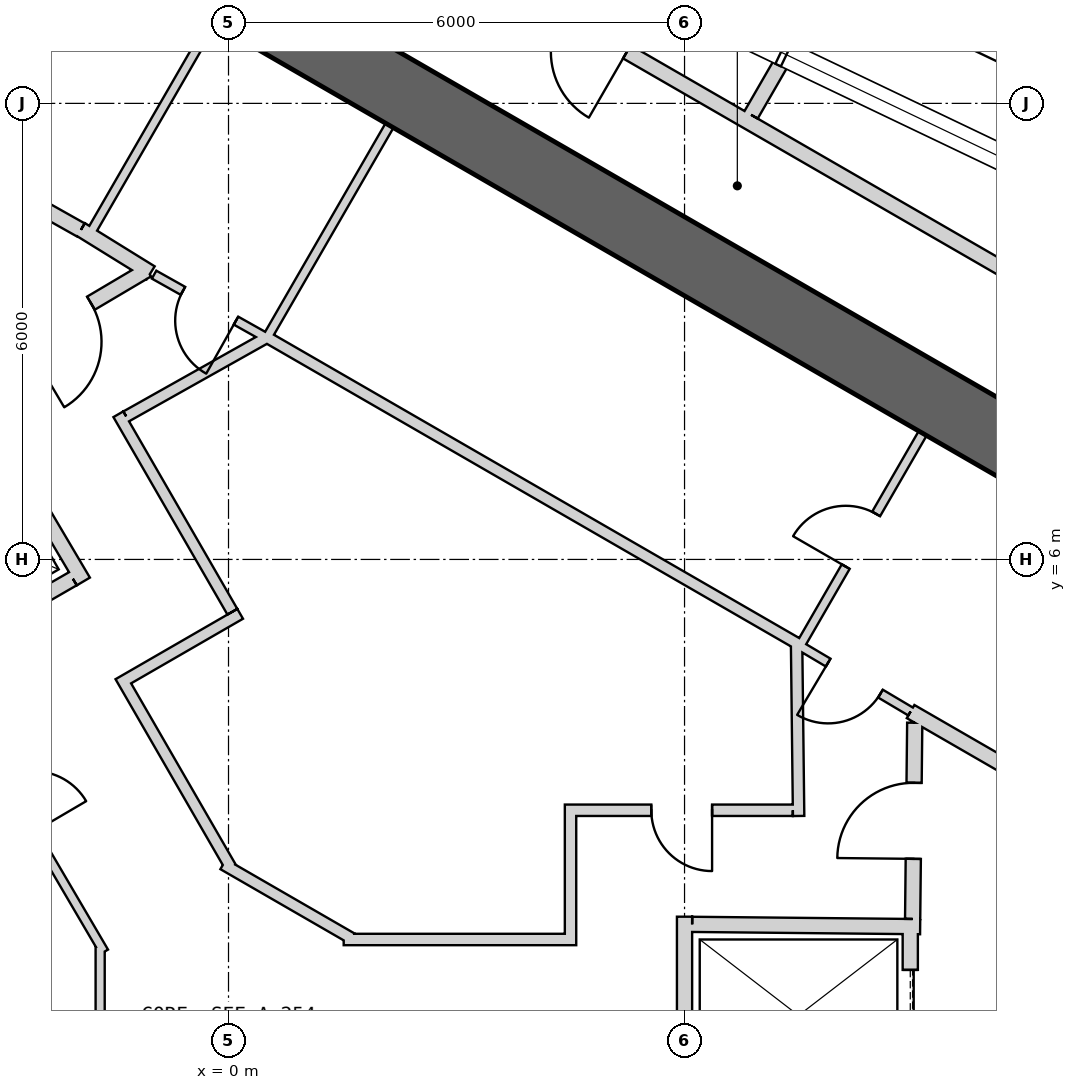
"""IFC4 building model, lengths in metres.
Left out: names, types, materials, properties, quantities, classifications, styles, units other than length and angle.
Written with IfcOpenShell. Run it as: python <this file> out.ifc"""

import sys

from ifc_helpers import new_model, si_unit, direction, frame, frame_2d, origin, place, context, subcontext, project, spatial, rectangle, extrude, element, fill, save


model = new_model("IFC4")
c1 = context("Model", 3, precision=1e-05, world=origin(), true_north=direction((0.0, 1.0)))
c2 = subcontext(c1, "Body", "Model", "MODEL_VIEW")
j1 = project(units=[si_unit("LENGTHUNIT", "METRE"), si_unit("PLANEANGLEUNIT", "RADIAN")], contexts=[c1])
p1 = place(None, origin())
s1 = spatial("IfcSite", under=j1, at=p1, CompositionType="ELEMENT")
p2 = place(p1, origin())
s2 = spatial("IfcBuilding", under=s1, at=p2, CompositionType="ELEMENT")
p3 = place(p2, frame((0.0, 0.0, 430.3)))
s3 = spatial("IfcBuildingStorey", under=s2, at=p3, CompositionType="ELEMENT", Elevation=430.3)
p4 = place(p3, frame((19.475, 2.208, 0.0), z_axis=(0.0, 0.0, 1.0), x_axis=(-0.866028369851, 0.499994862586, 0.0)))
e1 = element("IfcWall", 1, at=p4, inside=s3, PredefinedType="SHEAR", context=c2, shape_type="SweptSolid", body=[
    extrude(rectangle(XDim=31.523, YDim=0.9, at=frame_2d((15.762, 0.0))), origin(), (0.0, 0.0, 1.0), 5.0),
])
p5 = place(p4, frame((3.612, 0.0, 0.0)))
e2 = element("IfcOpeningElement", 2, at=p5, cuts=e1, PredefinedType="OPENING", context=c2, shape_type="SweptSolid", body=[
    extrude(rectangle(XDim=1.2, YDim=2.4, at=frame_2d((0.6, 1.2))), frame((0.0, 0.46, 0.0), z_axis=(0.0, -1.0, 0.0), x_axis=(1.0, 0.0, 0.0)), (0.0, 0.0, 1.0), 0.92),
])
p6 = place(p4, frame((26.712, 0.0, 0.0)))
e3 = element("IfcOpeningElement", 3, at=p6, cuts=e1, PredefinedType="OPENING", context=c2, shape_type="SweptSolid", body=[
    extrude(rectangle(XDim=1.2, YDim=2.4, at=frame_2d((0.6, 1.2))), frame((0.0, 0.46, 0.0), z_axis=(0.0, -1.0, 0.0), x_axis=(1.0, 0.0, 0.0)), (0.0, 0.0, 1.0), 0.92),
])
p7 = place(p3, frame((8.97, 1.2, 0.0), z_axis=(0.0, 0.0, 1.0), x_axis=(0.0, -1.0, 0.0)))
e4 = element("IfcWall", 4, at=p7, inside=s3, PredefinedType="PLUMBINGWALL", context=c2, shape_type="SweptSolid", body=[
    extrude(rectangle(XDim=2.4, YDim=0.2, at=frame_2d((1.2, 0.0))), origin(), (0.0, 0.0, 1.0), 4.75),
])
p8 = place(p7, frame((0.6, 0.0, 0.0)))
e5 = element("IfcOpeningElement", 5, at=p8, cuts=e4, PredefinedType="OPENING", context=c2, shape_type="SweptSolid", body=[
    extrude(rectangle(XDim=1.2, YDim=2.4, at=frame_2d((0.6, 1.2))), frame((0.0, 0.11, 0.0), z_axis=(0.0, -1.0, 0.0), x_axis=(1.0, 0.0, 0.0)), (0.0, 0.0, 1.0), 0.22),
])
p9 = place(p3, frame((6.0, -1.1, 0.0), z_axis=(0.0, 0.0, 1.0), x_axis=(0.0, 1.0, 0.0)))
e6 = element("IfcWall", 6, at=p9, inside=s3, PredefinedType="PLUMBINGWALL", context=c2, shape_type="SweptSolid", body=[
    extrude(rectangle(XDim=2.4, YDim=0.2, at=frame_2d((1.2, 0.0))), origin(), (0.0, 0.0, 1.0), 4.75),
])
p10 = place(p3, frame((9.1, 1.169, 0.0), z_axis=(0.0, 0.0, 1.0), x_axis=(-0.99994990606, 0.010009264196, 0.0)))
e7 = element("IfcWall", 7, at=p10, inside=s3, PredefinedType="PLUMBINGWALL", context=c2, shape_type="SweptSolid", body=[
    extrude(rectangle(XDim=3.0, YDim=0.2, at=frame_2d((1.5, 0.0))), origin(), (0.0, 0.0, 1.0), 4.75),
])
p11 = place(p3, frame((-2.047, 5.746, 0.0), z_axis=(0.0, 0.0, 1.0), x_axis=(-0.86605622881, -0.499946605688, 0.0)))
e8 = element("IfcWall", 8, at=p11, inside=s3, PredefinedType="PLUMBINGWALL", context=c2, shape_type="SweptSolid", body=[
    extrude(rectangle(XDim=2.2, YDim=0.2, at=frame_2d((1.1, 0.0))), origin(), (0.0, 0.0, 1.0), 4.75),
])
p12 = place(p3, frame((-3.538, 8.465, 0.0), z_axis=(0.0, 0.0, 1.0), x_axis=(0.508616218331, -0.860993346345, 0.0)))
e9 = element("IfcWall", 9, at=p12, inside=s3, PredefinedType="PLUMBINGWALL", context=c2, shape_type="SweptSolid", body=[
    extrude(rectangle(XDim=3.2, YDim=0.2, at=frame_2d((1.6, 0.0))), origin(), (0.0, 0.0, 1.0), 4.75),
])
p13 = place(p3, frame((7.508, 4.845, 0.0), z_axis=(0.0, 0.0, 1.0), x_axis=(0.500017246033, 0.866015446554, 0.0)))
e10 = element("IfcWall", 10, at=p13, inside=s3, PredefinedType="PARTITIONING", context=c2, shape_type="SweptSolid", body=[
    extrude(rectangle(XDim=3.25, YDim=0.12, at=frame_2d((1.625, 0.0))), origin(), (0.0, 0.0, 1.0), 4.75),
])
p14 = place(p13, frame((1.225, 0.0, 0.0)))
e11 = element("IfcOpeningElement", 11, at=p14, cuts=e10, PredefinedType="OPENING", context=c2, shape_type="SweptSolid", body=[
    extrude(rectangle(XDim=0.8, YDim=2.1, at=frame_2d((0.4, 1.05))), frame((0.0, 0.07, 0.0), z_axis=(0.0, -1.0, 0.0), x_axis=(1.0, 0.0, 0.0)), (0.0, 0.0, 1.0), 0.14),
])
p15 = place(p3, frame((8.974, 3.999, 0.0), z_axis=(0.0, 0.0, 1.0), x_axis=(0.86601284211, -0.500021756827, 0.0)))
e12 = element("IfcWall", 12, at=p15, inside=s3, PredefinedType="PARTITIONING", context=c2, shape_type="SweptSolid", body=[
    extrude(rectangle(XDim=3.577, YDim=0.2, at=frame_2d((1.789, 0.0))), origin(), (0.0, 0.0, 1.0), 4.75),
])
p16 = place(p3, frame((7.493, 4.878, 0.0), z_axis=(0.0, 0.0, 1.0), x_axis=(0.859934455514, -0.510404479035, 0.0)))
e13 = element("IfcWall", 13, at=p16, inside=s3, PredefinedType="PARTITIONING", context=c2, shape_type="SweptSolid", body=[
    extrude(rectangle(XDim=1.722, YDim=0.12, at=frame_2d((0.861, 0.0))), origin(), (0.0, 0.0, 1.0), 4.75),
])
p17 = place(p16, frame((0.461, 0.0, 0.0)))
e14 = element("IfcOpeningElement", 14, at=p17, cuts=e13, PredefinedType="OPENING", context=c2, shape_type="SweptSolid", body=[
    extrude(rectangle(XDim=0.8, YDim=2.1, at=frame_2d((0.4, 1.05))), frame((0.0, 0.07, 0.0), z_axis=(0.0, -1.0, 0.0), x_axis=(1.0, 0.0, 0.0)), (0.0, 0.0, 1.0), 0.14),
])
p18 = place(p3, frame((2.119, 11.709, 0.0), z_axis=(0.0, 0.0, 1.0), x_axis=(-0.500017246033, -0.866015446554, 0.0)))
e15 = element("IfcWall", 15, at=p18, inside=s3, PredefinedType="PARTITIONING", context=c2, shape_type="SweptSolid", body=[
    extrude(rectangle(XDim=3.25, YDim=0.12, at=frame_2d((1.625, 0.0))), origin(), (0.0, 0.0, 1.0), 4.75),
])
p19 = place(p3, frame((7.497, 4.886, 0.0), z_axis=(0.0, 0.0, 1.0), x_axis=(-0.866030989016, 0.499990325971, 0.0)))
e16 = element("IfcWall", 16, at=p19, inside=s3, PredefinedType="PLUMBINGWALL", context=c2, shape_type="SweptSolid", body=[
    extrude(rectangle(XDim=8.1, YDim=0.15, at=frame_2d((4.05, 0.0))), origin(), (0.0, 0.0, 1.0), 4.75),
])
p20 = place(p3, frame((-0.22, 13.06, 0.0), z_axis=(0.0, 0.0, 1.0), x_axis=(-0.499984717929, -0.866034226713, 0.0)))
e17 = element("IfcWall", 17, at=p20, inside=s3, PredefinedType="PARTITIONING", context=c2, shape_type="SweptSolid", body=[
    extrude(rectangle(XDim=3.25, YDim=0.12, at=frame_2d((1.625, 0.0))), origin(), (0.0, 0.0, 1.0), 4.75),
])
p21 = place(p3, frame((-1.941, 10.339, 0.0), z_axis=(0.0, 0.0, 1.0), x_axis=(0.850216889117, -0.526432561171, 0.0)))
e18 = element("IfcWall", 18, at=p21, inside=s3, PredefinedType="PARTITIONING", context=c2, shape_type="SweptSolid", body=[
    extrude(rectangle(XDim=1.078, YDim=0.2, at=frame_2d((0.539, 0.0))), origin(), (0.0, 0.0, 1.0), 4.75),
])
p22 = place(p3, frame((-0.979, 9.747, 0.0), z_axis=(0.0, 0.0, 1.0), x_axis=(0.871957532922, -0.489581515972, 0.0)))
e19 = element("IfcWall", 19, at=p22, inside=s3, PredefinedType="PARTITIONING", context=c2, shape_type="SweptSolid", body=[
    extrude(rectangle(XDim=1.672, YDim=0.12, at=frame_2d((0.836, 0.0))), origin(), (0.0, 0.0, 1.0), 4.75),
])
p23 = place(p22, frame((0.436, 0.0, 0.0)))
e20 = element("IfcOpeningElement", 20, at=p23, cuts=e19, PredefinedType="OPENING", context=c2, shape_type="SweptSolid", body=[
    extrude(rectangle(XDim=0.8, YDim=2.1, at=frame_2d((0.4, 1.05))), frame((0.0, 0.07, 0.0), z_axis=(0.0, -1.0, 0.0), x_axis=(1.0, 0.0, 0.0)), (0.0, 0.0, 1.0), 0.14),
])
p24 = place(p3, frame((-4.296, 11.659, 0.0), z_axis=(0.0, 0.0, 1.0), x_axis=(0.871534483978, -0.490334215854, 0.0)))
e21 = element("IfcWall", 21, at=p24, inside=s3, PredefinedType="PARTITIONING", context=c2, shape_type="SweptSolid", body=[
    extrude(rectangle(XDim=2.7, YDim=0.2, at=frame_2d((1.35, 0.0))), origin(), (0.0, 0.0, 1.0), 4.75),
])
p25 = place(p3, frame((9.001, 1.27, 0.0), z_axis=(0.0, 0.0, 1.0), x_axis=(0.010780534828, 0.999941888346, 0.0)))
e22 = element("IfcWall", 22, at=p25, inside=s3, PredefinedType="PARTITIONING", context=c2, shape_type="SweptSolid", body=[
    extrude(rectangle(XDim=2.582, YDim=0.2, at=frame_2d((1.291, 0.0))), origin(), (0.0, 0.0, 1.0), 4.75),
])
p26 = place(p25, frame((0.791, 0.0, 0.0)))
e23 = element("IfcOpeningElement", 23, at=p26, cuts=e22, PredefinedType="OPENING", context=c2, shape_type="SweptSolid", body=[
    extrude(rectangle(XDim=1.0, YDim=2.1, at=frame_2d((0.5, 1.05))), frame((0.0, 0.11, 0.0), z_axis=(0.0, -1.0, 0.0), x_axis=(1.0, 0.0, 0.0)), (0.0, 0.0, 1.0), 0.22),
])
p27 = place(p3, frame((-1.07, 9.809, 0.0), z_axis=(0.0, 0.0, 1.0), x_axis=(-0.860603293832, -0.509275927808, 0.0)))
e24 = element("IfcWall", 24, at=p27, inside=s3, PredefinedType="PARTITIONING", context=c2, shape_type="SweptSolid", body=[
    extrude(rectangle(XDim=2.708, YDim=0.2, at=frame_2d((1.354, 0.0))), origin(), (0.0, 0.0, 1.0), 4.75),
])
p28 = place(p27, frame((0.86, 0.0, 0.0)))
e25 = element("IfcOpeningElement", 25, at=p28, cuts=e24, PredefinedType="OPENING", context=c2, shape_type="SweptSolid", body=[
    extrude(rectangle(XDim=1.0, YDim=2.1, at=frame_2d((0.5, 1.05))), frame((0.0, 0.11, 0.0), z_axis=(0.0, -1.0, 0.0), x_axis=(1.0, 0.0, 0.0)), (0.0, 0.0, 1.0), 0.22),
])
p29 = place(p3, frame((-1.637, 0.837, 0.0), z_axis=(0.0, 0.0, 1.0), x_axis=(-0.505858978646, 0.862616191433, 0.0)))
e26 = element("IfcWall", 26, at=p29, inside=s3, PredefinedType="PARTITIONING", context=c2, shape_type="SweptSolid", body=[
    extrude(rectangle(XDim=4.357, YDim=0.12, at=frame_2d((2.179, 0.0))), origin(), (0.0, 0.0, 1.0), 4.75),
])
p30 = place(p29, frame((1.83, 0.0, 0.0)))
e27 = element("IfcOpeningElement", 27, at=p30, cuts=e26, PredefinedType="OPENING", context=c2, shape_type="SweptSolid", body=[
    extrude(rectangle(XDim=0.8, YDim=2.1, at=frame_2d((0.4, 1.05))), frame((0.0, 0.07, 0.0), z_axis=(0.0, -1.0, 0.0), x_axis=(1.0, 0.0, 0.0)), (0.0, 0.0, 1.0), 0.14),
])
p31 = place(p3, frame((-1.689, -1.027, 0.0), z_axis=(0.0, 0.0, 1.0), x_axis=(0.0, 1.0, 0.0)))
e28 = element("IfcWall", 28, at=p31, inside=s3, PredefinedType="PARTITIONING", context=c2, shape_type="SweptSolid", body=[
    extrude(rectangle(XDim=1.933, YDim=0.12, at=frame_2d((0.967, 0.0))), origin(), (0.0, 0.0, 1.0), 4.75),
])
p32 = place(p3, frame((7.501, 2.625, 0.0), z_axis=(0.0, 0.0, 1.0), x_axis=(-0.01177286769, 0.999930697392, 0.0)))
e29 = element("IfcWall", 29, at=p32, inside=s3, PredefinedType="PLUMBINGWALL", context=c2, shape_type="SweptSolid", body=[
    extrude(rectangle(XDim=2.24, YDim=0.15, at=frame_2d((1.12, 0.0))), origin(), (0.0, 0.0, 1.0), 4.75),
])
p33 = place(p3, frame((4.425, 2.7, 0.0), z_axis=(0.0, 0.0, 1.0), x_axis=(1.0, 0.0, 0.0)))
e30 = element("IfcWall", 30, at=p33, inside=s3, PredefinedType="PLUMBINGWALL", context=c2, shape_type="SweptSolid", body=[
    extrude(rectangle(XDim=3.0, YDim=0.15, at=frame_2d((1.5, 0.0))), origin(), (0.0, 0.0, 1.0), 4.75),
])
p34 = place(p33, frame((1.137, 0.0, 0.0)))
e31 = element("IfcOpeningElement", 31, at=p34, cuts=e30, PredefinedType="OPENING", context=c2, shape_type="SweptSolid", body=[
    extrude(rectangle(XDim=0.8, YDim=2.1, at=frame_2d((0.4, 1.05))), frame((0.0, 0.085, 0.0), z_axis=(0.0, -1.0, 0.0), x_axis=(1.0, 0.0, 0.0)), (0.0, 0.0, 1.0), 0.17),
])
p35 = place(p3, frame((4.5, 0.925, 0.0), z_axis=(0.0, 0.0, 1.0), x_axis=(0.0, 1.0, 0.0)))
e32 = element("IfcWall", 32, at=p35, inside=s3, PredefinedType="PLUMBINGWALL", context=c2, shape_type="SweptSolid", body=[
    extrude(rectangle(XDim=1.7, YDim=0.15, at=frame_2d((0.85, 0.0))), origin(), (0.0, 0.0, 1.0), 4.75),
])
p36 = place(p3, frame((1.516, 1.0, 0.0), z_axis=(0.0, 0.0, 1.0), x_axis=(1.0, 0.0, 0.0)))
e33 = element("IfcWall", 33, at=p36, inside=s3, PredefinedType="PLUMBINGWALL", context=c2, shape_type="SweptSolid", body=[
    extrude(rectangle(XDim=2.909, YDim=0.15, at=frame_2d((1.455, 0.0))), origin(), (0.0, 0.0, 1.0), 4.75),
])
p37 = place(p3, frame((-0.069, 1.99, 0.0), z_axis=(0.0, 0.0, 1.0), x_axis=(0.866015184065, -0.500017700655, 0.0)))
e34 = element("IfcWall", 34, at=p37, inside=s3, PredefinedType="PLUMBINGWALL", context=c2, shape_type="SweptSolid", body=[
    extrude(rectangle(XDim=1.957, YDim=0.15, at=frame_2d((0.978, 0.0))), origin(), (0.0, 0.0, 1.0), 4.75),
])
p38 = place(p3, frame((-1.421, 4.462, 0.0), z_axis=(0.0, 0.0, 1.0), x_axis=(0.499969679245, -0.866042908773, 0.0)))
e35 = element("IfcWall", 35, at=p38, inside=s3, PredefinedType="PLUMBINGWALL", context=c2, shape_type="SweptSolid", body=[
    extrude(rectangle(XDim=2.906, YDim=0.15, at=frame_2d((1.453, 0.0))), origin(), (0.0, 0.0, 1.0), 4.75),
])
p39 = place(p3, frame((0.153, 5.285, 0.0), z_axis=(0.0, 0.0, 1.0), x_axis=(-0.866025371046, -0.500000056704, 0.0)))
e36 = element("IfcWall", 36, at=p39, inside=s3, PredefinedType="PLUMBINGWALL", context=c2, shape_type="SweptSolid", body=[
    extrude(rectangle(XDim=1.7, YDim=0.15, at=frame_2d((0.85, 0.0))), origin(), (0.0, 0.0, 1.0), 4.75),
])
p40 = place(p3, frame((-1.449, 7.91, 0.0), z_axis=(0.0, 0.0, 1.0), x_axis=(0.499990139034, -0.866031096941, 0.0)))
e37 = element("IfcWall", 37, at=p40, inside=s3, PredefinedType="PLUMBINGWALL", context=c2, shape_type="SweptSolid", body=[
    extrude(rectangle(XDim=3.0, YDim=0.15, at=frame_2d((1.5, 0.0))), origin(), (0.0, 0.0, 1.0), 4.75),
])
p41 = place(p3, frame((0.475, 8.905, 0.0), z_axis=(0.0, 0.0, 1.0), x_axis=(-0.871843752163, -0.489784107353, 0.0)))
e38 = element("IfcWall", 38, at=p41, inside=s3, PredefinedType="PLUMBINGWALL", context=c2, shape_type="SweptSolid", body=[
    extrude(rectangle(XDim=2.09, YDim=0.15, at=frame_2d((1.045, 0.0))), origin(), (0.0, 0.0, 1.0), 4.75),
])
p42 = place(p3, frame((20.834, 3.675, 0.0), z_axis=(0.0, 0.0, 1.0), x_axis=(-0.866028536494, 0.499994573949, 0.0)))
e39 = element("IfcWall", 39, at=p42, inside=s3, PredefinedType="PARTITIONING", context=c2, shape_type="SweptSolid", body=[
    extrude(rectangle(XDim=32.411, YDim=0.2, at=frame_2d((16.206, 0.0))), origin(), (0.0, 0.0, 1.0), 4.75),
])
p43 = place(p42, frame((7.7, 0.0, 0.0)))
e40 = element("IfcOpeningElement", 40, at=p43, cuts=e39, PredefinedType="OPENING", context=c2, shape_type="SweptSolid", body=[
    extrude(rectangle(XDim=1.0, YDim=2.1, at=frame_2d((0.5, 1.05))), frame((0.0, 0.11, 0.0), z_axis=(0.0, -1.0, 0.0), x_axis=(1.0, 0.0, 0.0)), (0.0, 0.0, 1.0), 0.22),
])
p44 = place(p42, frame((18.006, 0.0, 0.0)))
e41 = element("IfcOpeningElement", 41, at=p44, cuts=e39, PredefinedType="OPENING", context=c2, shape_type="SweptSolid", body=[
    extrude(rectangle(XDim=1.0, YDim=2.1, at=frame_2d((0.5, 1.05))), frame((0.0, 0.11, 0.0), z_axis=(0.0, -1.0, 0.0), x_axis=(1.0, 0.0, 0.0)), (0.0, 0.0, 1.0), 0.22),
])
p45 = place(p3, frame((7.271, 12.534, 0.0), z_axis=(0.0, 0.0, 1.0), x_axis=(-0.500025443912, -0.866010713236, 0.0)))
e42 = element("IfcWall", 42, at=p45, inside=s3, PredefinedType="PARTITIONING", context=c2, shape_type="SweptSolid", body=[
    extrude(rectangle(XDim=0.791, YDim=0.2, at=frame_2d((0.395, 0.0))), origin(), (0.0, 0.0, 1.0), 4.75),
])
p46 = place(p26, origin())
e43 = element("IfcDoor", 43, at=p46, inside=s3, OperationType="SINGLE_SWING_LEFT", PredefinedType="USERDEFINED", context=c2, shape_type="SweptSolid", body=[
    extrude(rectangle(XDim=1.0, YDim=2.1, at=frame_2d((0.5, 1.05))), frame((0.0, 0.025, 0.0), z_axis=(0.0, -1.0, 0.0), x_axis=(1.0, 0.0, 0.0)), (0.0, 0.0, 1.0), 0.05),
])
fill(e23, e43)
p47 = place(p8, origin())
e44 = element("IfcDoor", 44, at=p47, inside=s3, OperationType="SLIDING_TO_LEFT", PredefinedType="USERDEFINED", context=c2, shape_type="SweptSolid", body=[
    extrude(rectangle(XDim=1.2, YDim=2.4, at=frame_2d((0.6, 1.2))), frame((0.0, 0.025, 0.0), z_axis=(0.0, -1.0, 0.0), x_axis=(1.0, 0.0, 0.0)), (0.0, 0.0, 1.0), 0.05),
])
fill(e5, e44)
p48 = place(p28, origin())
e45 = element("IfcDoor", 45, at=p48, inside=s3, OperationType="SINGLE_SWING_RIGHT", PredefinedType="USERDEFINED", context=c2, shape_type="SweptSolid", body=[
    extrude(rectangle(XDim=1.0, YDim=2.1, at=frame_2d((0.5, 1.05))), frame((0.0, 0.025, 0.0), z_axis=(0.0, -1.0, 0.0), x_axis=(1.0, 0.0, 0.0)), (0.0, 0.0, 1.0), 0.05),
])
fill(e25, e45)
p49 = place(p34, origin())
e46 = element("IfcDoor", 46, at=p49, inside=s3, OperationType="SINGLE_SWING_RIGHT", PredefinedType="USERDEFINED", context=c2, shape_type="SweptSolid", body=[
    extrude(rectangle(XDim=0.8, YDim=2.1, at=frame_2d((0.4, 1.05))), frame((0.0, 0.025, 0.0), z_axis=(0.0, -1.0, 0.0), x_axis=(1.0, 0.0, 0.0)), (0.0, 0.0, 1.0), 0.05),
])
fill(e31, e46)
p50 = place(p17, origin())
e47 = element("IfcDoor", 47, at=p50, inside=s3, OperationType="SINGLE_SWING_LEFT", PredefinedType="USERDEFINED", context=c2, shape_type="SweptSolid", body=[
    extrude(rectangle(XDim=0.8, YDim=2.1, at=frame_2d((0.4, 1.05))), frame((0.0, 0.025, 0.0), z_axis=(0.0, -1.0, 0.0), x_axis=(1.0, 0.0, 0.0)), (0.0, 0.0, 1.0), 0.05),
])
fill(e14, e47)
p51 = place(p14, origin())
e48 = element("IfcDoor", 48, at=p51, inside=s3, OperationType="SINGLE_SWING_LEFT", PredefinedType="USERDEFINED", context=c2, shape_type="SweptSolid", body=[
    extrude(rectangle(XDim=0.8, YDim=2.1, at=frame_2d((0.4, 1.05))), frame((0.0, 0.025, 0.0), z_axis=(0.0, -1.0, 0.0), x_axis=(1.0, 0.0, 0.0)), (0.0, 0.0, 1.0), 0.05),
])
fill(e11, e48)
p52 = place(p23, origin())
e49 = element("IfcDoor", 49, at=p52, inside=s3, OperationType="SINGLE_SWING_RIGHT", PredefinedType="USERDEFINED", context=c2, shape_type="SweptSolid", body=[
    extrude(rectangle(XDim=0.8, YDim=2.1, at=frame_2d((0.4, 1.05))), frame((0.0, 0.025, 0.0), z_axis=(0.0, -1.0, 0.0), x_axis=(1.0, 0.0, 0.0)), (0.0, 0.0, 1.0), 0.05),
])
fill(e20, e49)
p53 = place(p44, origin())
e50 = element("IfcDoor", 50, at=p53, inside=s3, OperationType="SINGLE_SWING_LEFT", PredefinedType="USERDEFINED", context=c2, shape_type="SweptSolid", body=[
    extrude(rectangle(XDim=1.0, YDim=2.1, at=frame_2d((0.5, 1.05))), frame((0.0, 0.025, 0.0), z_axis=(0.0, -1.0, 0.0), x_axis=(1.0, 0.0, 0.0)), (0.0, 0.0, 1.0), 0.05),
])
fill(e41, e50)
save(model, sys.argv[1])
